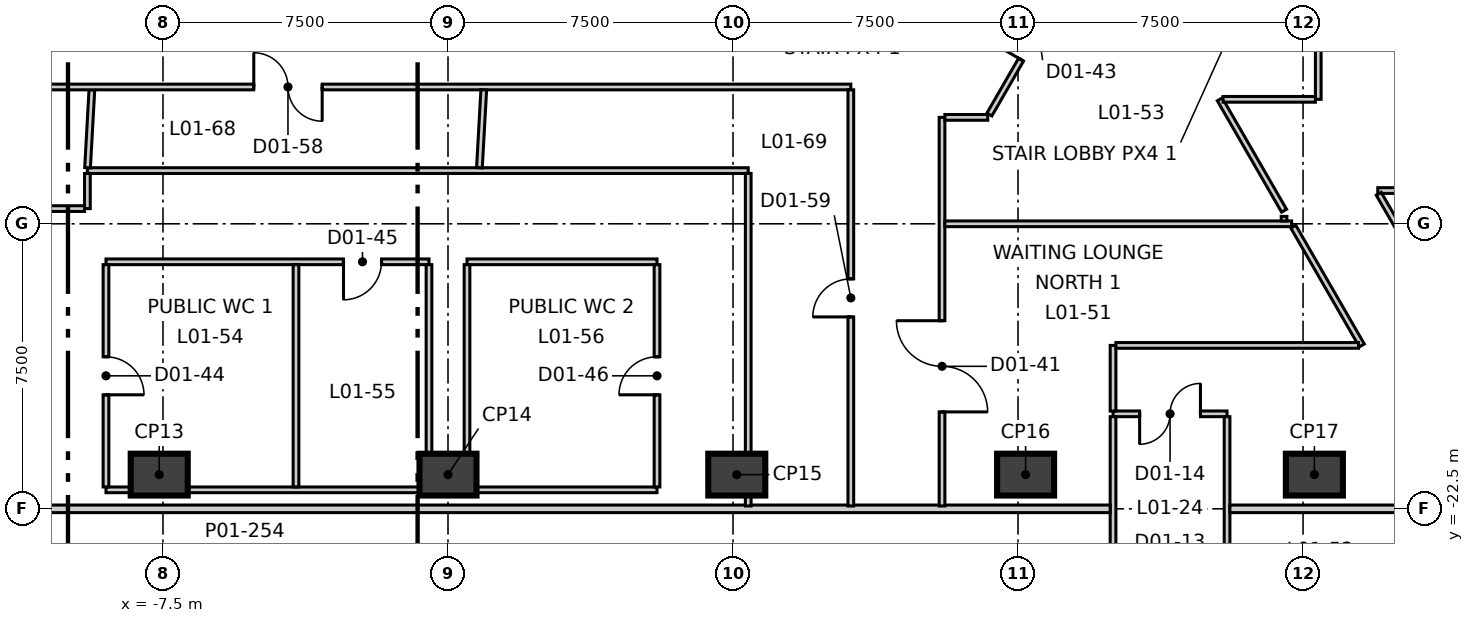
"""IFC4 building model, lengths in metres.
Left out: names, types, materials, properties, quantities, classifications, styles, units other than length and angle.
Written with IfcOpenShell. Run it as: python <this file> out.ifc"""

import sys

from ifc_helpers import new_model, si_unit, direction, frame, frame_2d, origin, origin_2d, place, context, subcontext, project, spatial, rectangle, extrude, element, fill, save


model = new_model("IFC4")
c1 = context("Model", 3, precision=1e-05, world=origin(), true_north=direction((0.0, 1.0)))
c2 = subcontext(c1, "Body", "Model", "MODEL_VIEW")
j1 = project(units=[si_unit("LENGTHUNIT", "METRE"), si_unit("PLANEANGLEUNIT", "RADIAN")], contexts=[c1])
p1 = place(None, origin())
s1 = spatial("IfcSite", under=j1, at=p1, CompositionType="ELEMENT")
p2 = place(p1, origin())
s2 = spatial("IfcBuilding", under=s1, at=p2, CompositionType="ELEMENT")
p3 = place(p2, frame((0.0, 0.0, 8.5)))
s3 = spatial("IfcBuildingStorey", under=s2, at=p3, CompositionType="ELEMENT", Elevation=8.5)
for number, where, z_axis, x_axis in (
    (1, (-7.599, -21.6, -0.4), (0.0, 0.0, 1.0), (1.0, 0.0, 0.0)),
    (2, (0.0, -21.6, -0.4), (0.0, 0.0, 1.0), (1.0, 0.0, 0.0)),
    (3, (7.599, -21.6, -0.4), (0.0, 0.0, 1.0), (1.0, 0.0, 0.0)),
    (4, (15.199, -21.6, -0.4), (0.0, 0.0, 1.0), (1.0, 0.0, 0.0)),
    (5, (22.798, -21.6, -0.4), (0.0, 0.0, 1.0), (1.0, 0.0, 0.0)),
):
    element("IfcColumn", number, at=place(p3, frame(where, z_axis=z_axis, x_axis=x_axis)), inside=s3, PredefinedType="COLUMN", context=c2, shape_type="SweptSolid", body=[
        extrude(rectangle(XDim=1.5, YDim=1.1, at=origin_2d()), origin(), (0.0, 0.0, 1.0), 6.0),
    ])
p4 = place(p3, frame((17.5, -20.0, 0.0), z_axis=(0.0, 0.0, 1.0), x_axis=(1.0, 0.0, 0.0)))
e6 = element("IfcWall", 6, at=p4, inside=s3, PredefinedType="PARTITIONING", context=c2, shape_type="SweptSolid", body=[
    extrude(rectangle(XDim=3.0, YDim=0.15, at=frame_2d((1.5, 0.0))), origin(), (0.0, 0.0, 1.0), 5.6),
])
p5 = place(p4, frame((0.7, 0.0, 0.0)))
e7 = element("IfcOpeningElement", 7, at=p5, cuts=e6, PredefinedType="OPENING", context=c2, shape_type="SweptSolid", body=[
    extrude(rectangle(XDim=1.6, YDim=2.1, at=frame_2d((0.8, 1.05))), frame((0.0, 0.085, 0.0), z_axis=(0.0, -1.0, 0.0), x_axis=(1.0, 0.0, 0.0)), (0.0, 0.0, 1.0), 0.17),
])
for number, where, z_axis, x_axis in (
    (8, (17.5, -24.925, 0.0), (0.0, 0.0, 1.0), (0.0, 1.0, 0.0)),
    (9, (20.5, -24.925, 0.0), (0.0, 0.0, 1.0), (0.0, 1.0, 0.0)),
):
    element("IfcWall", number, at=place(p3, frame(where, z_axis=z_axis, x_axis=x_axis)), inside=s3, PredefinedType="PARTITIONING", context=c2, shape_type="SweptSolid", body=[
        extrude(rectangle(XDim=4.85, YDim=0.15, at=frame_2d((2.425, 0.0))), origin(), (0.0, 0.0, 1.0), 5.6),
    ])
p6 = place(p3, frame((-17.425, -22.5, 0.0), z_axis=(0.0, 0.0, 1.0), x_axis=(1.0, 0.0, 0.0)))
e10 = element("IfcWall", 10, at=p6, inside=s3, PredefinedType="SOLIDWALL", context=c2, shape_type="SweptSolid", body=[
    extrude(rectangle(XDim=34.85, YDim=0.2, at=frame_2d((17.425, 0.0))), origin(), (0.0, 0.0, 1.0), 5.6),
])
p7 = place(p3, frame((20.575, -22.5, 0.0), z_axis=(0.0, 0.0, 1.0), x_axis=(1.0, 0.0, 0.0)))
e11 = element("IfcWall", 11, at=p7, inside=s3, PredefinedType="SOLIDWALL", context=c2, shape_type="SweptSolid", body=[
    extrude(rectangle(XDim=11.266, YDim=0.2, at=frame_2d((5.633, 0.0))), origin(), (0.0, 0.0, 1.0), 5.6),
])
p8 = place(p3, frame((24.466, -14.125, 0.0), z_axis=(0.0, 0.0, 1.0), x_axis=(1.0, 0.0, 0.0)))
e12 = element("IfcWall", 12, at=p8, inside=s3, PredefinedType="PARTITIONING", context=c2, shape_type="SweptSolid", body=[
    extrude(rectangle(XDim=0.834, YDim=0.15, at=frame_2d((0.417, 0.0))), origin(), (0.0, 0.0, 1.0), 5.6),
])
p9 = place(p3, frame((-9.489, -13.6, 0.0), z_axis=(0.0, 0.0, 1.0), x_axis=(1.0, 0.0, 0.0)))
e13 = element("IfcWall", 13, at=p9, inside=s3, PredefinedType="PARTITIONING", context=c2, shape_type="SweptSolid", body=[
    extrude(rectangle(XDim=17.389, YDim=0.15, at=frame_2d((8.694, 0.0))), origin(), (0.0, 0.0, 1.0), 5.6),
])
p10 = place(p3, frame((-9.485, -13.525, 0.0), z_axis=(0.0, 0.0, 1.0), x_axis=(0.055535883175, 0.99845669194, 0.0)))
e14 = element("IfcWall", 14, at=p10, inside=s3, PredefinedType="PARTITIONING", context=c2, shape_type="SweptSolid", body=[
    extrude(rectangle(XDim=2.053, YDim=0.15, at=frame_2d((1.026, 0.0))), origin(), (0.0, 0.0, 1.0), 5.6),
])
p11 = place(p3, frame((-9.489, -14.6, 0.0), z_axis=(0.0, 0.0, 1.0), x_axis=(0.0, 1.0, 0.0)))
e15 = element("IfcWall", 15, at=p11, inside=s3, PredefinedType="PARTITIONING", context=c2, shape_type="SweptSolid", body=[
    extrude(rectangle(XDim=0.925, YDim=0.15, at=frame_2d((0.462, 0.0))), origin(), (0.0, 0.0, 1.0), 5.6),
])
p12 = place(p3, frame((-19.6, -14.6, 0.0), z_axis=(0.0, 0.0, 1.0), x_axis=(1.0, 0.0, 0.0)))
e16 = element("IfcWall", 16, at=p12, inside=s3, PredefinedType="PARTITIONING", context=c2, shape_type="SweptSolid", body=[
    extrude(rectangle(XDim=10.036, YDim=0.15, at=frame_2d((5.018, 0.0))), origin(), (0.0, 0.0, 1.0), 5.6),
])
p13 = place(p12, frame((4.156, 0.0, 0.0)))
e17 = element("IfcOpeningElement", 17, at=p13, cuts=e16, PredefinedType="OPENING", context=c2, shape_type="SweptSolid", body=[
    extrude(rectangle(XDim=1.8, YDim=2.1, at=frame_2d((0.9, 1.05))), frame((0.0, 0.085, 0.0), z_axis=(0.0, -1.0, 0.0), x_axis=(1.0, 0.0, 0.0)), (0.0, 0.0, 1.0), 0.17),
])
p14 = place(p3, frame((-13.654, -11.4, 0.0), z_axis=(0.0, 0.0, 1.0), x_axis=(1.0, 0.0, 0.0)))
e18 = element("IfcWall", 18, at=p14, inside=s3, PredefinedType="PARTITIONING", context=c2, shape_type="SweptSolid", body=[
    extrude(rectangle(XDim=24.254, YDim=0.15, at=frame_2d((12.127, 0.0))), origin(), (0.0, 0.0, 1.0), 5.6),
])
p15 = place(p14, frame((8.543, 0.0, 0.0)))
e19 = element("IfcOpeningElement", 19, at=p15, cuts=e18, PredefinedType="OPENING", context=c2, shape_type="SweptSolid", body=[
    extrude(rectangle(XDim=1.8, YDim=2.1, at=frame_2d((0.9, 1.05))), frame((0.0, 0.085, 0.0), z_axis=(0.0, -1.0, 0.0), x_axis=(1.0, 0.0, 0.0)), (0.0, 0.0, 1.0), 0.17),
])
p16 = place(p3, frame((-9.0, -16.0, 0.0), z_axis=(0.0, 0.0, 1.0), x_axis=(1.0, 0.0, 0.0)))
e20 = element("IfcWall", 20, at=p16, inside=s3, PredefinedType="PARTITIONING", context=c2, shape_type="SweptSolid", body=[
    extrude(rectangle(XDim=8.5, YDim=0.15, at=frame_2d((4.25, 0.0))), origin(), (0.0, 0.0, 1.0), 5.6),
])
p17 = place(p16, frame((6.25, 0.0, 0.0)))
e21 = element("IfcOpeningElement", 21, at=p17, cuts=e20, PredefinedType="OPENING", context=c2, shape_type="SweptSolid", body=[
    extrude(rectangle(XDim=1.0, YDim=2.1, at=frame_2d((0.5, 1.05))), frame((0.0, 0.085, 0.0), z_axis=(0.0, -1.0, 0.0), x_axis=(1.0, 0.0, 0.0)), (0.0, 0.0, 1.0), 0.17),
])
p18 = place(p3, frame((0.5, -16.0, 0.0), z_axis=(0.0, 0.0, 1.0), x_axis=(1.0, 0.0, 0.0)))
e22 = element("IfcWall", 22, at=p18, inside=s3, PredefinedType="PARTITIONING", context=c2, shape_type="SweptSolid", body=[
    extrude(rectangle(XDim=5.0, YDim=0.15, at=frame_2d((2.5, 0.0))), origin(), (0.0, 0.0, 1.0), 5.6),
])
p19 = place(p3, frame((-0.5, -22.0, 0.0), z_axis=(0.0, 0.0, 1.0), x_axis=(0.0, 1.0, 0.0)))
e23 = element("IfcWall", 23, at=p19, inside=s3, PredefinedType="PARTITIONING", context=c2, shape_type="SweptSolid", body=[
    extrude(rectangle(XDim=5.925, YDim=0.15, at=frame_2d((2.962, 0.0))), origin(), (0.0, 0.0, 1.0), 5.1),
])
p20 = place(p3, frame((-9.0, -22.0, 0.0), z_axis=(0.0, 0.0, 1.0), x_axis=(1.0, 0.0, 0.0)))
e24 = element("IfcWall", 24, at=p20, inside=s3, PredefinedType="PARTITIONING", context=c2, shape_type="SweptSolid", body=[
    extrude(rectangle(XDim=8.425, YDim=0.15, at=frame_2d((4.212, 0.0))), origin(), (0.0, 0.0, 1.0), 5.6),
])
p21 = place(p3, frame((0.5, -22.0, 0.0), z_axis=(0.0, 0.0, 1.0), x_axis=(1.0, 0.0, 0.0)))
e25 = element("IfcWall", 25, at=p21, inside=s3, PredefinedType="PARTITIONING", context=c2, shape_type="SweptSolid", body=[
    extrude(rectangle(XDim=5.0, YDim=0.15, at=frame_2d((2.5, 0.0))), origin(), (0.0, 0.0, 1.0), 5.6),
])
p22 = place(p3, frame((-4.0, -21.925, 0.0), z_axis=(0.0, 0.0, 1.0), x_axis=(0.0, 1.0, 0.0)))
e26 = element("IfcWall", 26, at=p22, inside=s3, PredefinedType="PARTITIONING", context=c2, shape_type="SweptSolid", body=[
    extrude(rectangle(XDim=5.85, YDim=0.15, at=frame_2d((2.925, 0.0))), origin(), (0.0, 0.0, 1.0), 5.6),
])
p23 = place(p3, frame((-9.0, -21.925, 0.0), z_axis=(0.0, 0.0, 1.0), x_axis=(0.0, 1.0, 0.0)))
e27 = element("IfcWall", 27, at=p23, inside=s3, PredefinedType="PARTITIONING", context=c2, shape_type="SweptSolid", body=[
    extrude(rectangle(XDim=5.85, YDim=0.15, at=frame_2d((2.925, 0.0))), origin(), (0.0, 0.0, 1.0), 5.6),
])
p24 = place(p23, frame((2.425, 0.0, 0.0)))
e28 = element("IfcOpeningElement", 28, at=p24, cuts=e27, PredefinedType="OPENING", context=c2, shape_type="SweptSolid", body=[
    extrude(rectangle(XDim=1.0, YDim=2.1, at=frame_2d((0.5, 1.05))), frame((0.0, 0.085, 0.0), z_axis=(0.0, -1.0, 0.0), x_axis=(1.0, 0.0, 0.0)), (0.0, 0.0, 1.0), 0.17),
])
p25 = place(p3, frame((7.9, -22.425, 0.0), z_axis=(0.0, 0.0, 1.0), x_axis=(0.0, 1.0, 0.0)))
e29 = element("IfcWall", 29, at=p25, inside=s3, PredefinedType="PARTITIONING", context=c2, shape_type="SweptSolid", body=[
    extrude(rectangle(XDim=8.75, YDim=0.15, at=frame_2d((4.375, 0.0))), origin(), (0.0, 0.0, 1.0), 5.6),
])
p26 = place(p3, frame((0.827, -13.525, 0.0), z_axis=(0.0, 0.0, 1.0), x_axis=(0.055535883175, 0.99845669194, 0.0)))
e30 = element("IfcWall", 30, at=p26, inside=s3, PredefinedType="PARTITIONING", context=c2, shape_type="SweptSolid", body=[
    extrude(rectangle(XDim=2.053, YDim=0.15, at=frame_2d((1.026, 0.0))), origin(), (0.0, 0.0, 1.0), 5.6),
])
p27 = place(p3, frame((10.6, -22.425, 0.0), z_axis=(0.0, 0.0, 1.0), x_axis=(0.0, 1.0, 0.0)))
e31 = element("IfcWall", 31, at=p27, inside=s3, PredefinedType="PARTITIONING", context=c2, shape_type="SweptSolid", body=[
    extrude(rectangle(XDim=10.95, YDim=0.15, at=frame_2d((5.475, 0.0))), origin(), (0.0, 0.0, 1.0), 5.6),
])
p28 = place(p27, frame((4.975, 0.0, 0.0)))
e32 = element("IfcOpeningElement", 32, at=p28, cuts=e31, PredefinedType="OPENING", context=c2, shape_type="SweptSolid", body=[
    extrude(rectangle(XDim=1.0, YDim=2.1, at=frame_2d((0.5, 1.05))), frame((0.0, 0.085, 0.0), z_axis=(0.0, -1.0, 0.0), x_axis=(1.0, 0.0, 0.0)), (0.0, 0.0, 1.0), 0.17),
])
p29 = place(p3, frame((17.5, -19.927, 0.0), z_axis=(0.0, 0.0, 1.0), x_axis=(0.0, 1.0, 0.0)))
e33 = element("IfcWall", 33, at=p29, inside=s3, PredefinedType="PARTITIONING", context=c2, shape_type="SweptSolid", body=[
    extrude(rectangle(XDim=1.727, YDim=0.15, at=frame_2d((0.864, 0.0))), origin(), (0.0, 0.0, 1.0), 5.6),
])
p30 = place(p3, frame((13.0, -22.425, 0.0), z_axis=(0.0, 0.0, 1.0), x_axis=(0.0, 1.0, 0.0)))
e34 = element("IfcWall", 34, at=p30, inside=s3, PredefinedType="PARTITIONING", context=c2, shape_type="SweptSolid", body=[
    extrude(rectangle(XDim=10.225, YDim=0.15, at=frame_2d((5.113, 0.0))), origin(), (0.0, 0.0, 1.0), 5.6),
])
p31 = place(p30, frame((2.475, 0.0, 0.0)))
e35 = element("IfcOpeningElement", 35, at=p31, cuts=e34, PredefinedType="OPENING", context=c2, shape_type="SweptSolid", body=[
    extrude(rectangle(XDim=2.4, YDim=2.1, at=frame_2d((1.2, 1.05))), frame((0.0, 0.085, 0.0), z_axis=(0.0, -1.0, 0.0), x_axis=(1.0, 0.0, 0.0)), (0.0, 0.0, 1.0), 0.17),
])
p32 = place(p3, frame((13.075, -15.0, 0.0), z_axis=(0.0, 0.0, 1.0), x_axis=(1.0, 0.0, 0.0)))
e36 = element("IfcWall", 36, at=p32, inside=s3, PredefinedType="PARTITIONING", context=c2, shape_type="SweptSolid", body=[
    extrude(rectangle(XDim=9.124, YDim=0.15, at=frame_2d((4.562, 0.0))), origin(), (0.0, 0.0, 1.0), 5.6),
])
p33 = place(p3, frame((13.075, -12.2, 0.0), z_axis=(0.0, 0.0, 1.0), x_axis=(1.0, 0.0, 0.0)))
e37 = element("IfcWall", 37, at=p33, inside=s3, PredefinedType="PARTITIONING", context=c2, shape_type="SweptSolid", body=[
    extrude(rectangle(XDim=1.128, YDim=0.15, at=frame_2d((0.564, 0.0))), origin(), (0.0, 0.0, 1.0), 5.6),
])
p34 = place(p3, frame((14.246, -12.125, 0.0), z_axis=(0.0, 0.0, 1.0), x_axis=(0.500018862428, 0.866014513283, 0.0)))
e38 = element("IfcWall", 38, at=p34, inside=s3, PredefinedType="PARTITIONING", context=c2, shape_type="SweptSolid", body=[
    extrude(rectangle(XDim=5.11, YDim=0.15, at=frame_2d((2.555, 0.0))), origin(), (0.0, 0.0, 1.0), 5.6),
])
p35 = place(p34, frame((1.669, 0.0, 0.0)))
e39 = element("IfcOpeningElement", 39, at=p35, cuts=e38, PredefinedType="OPENING", context=c2, shape_type="SweptSolid", body=[
    extrude(rectangle(XDim=1.8, YDim=2.1, at=frame_2d((0.9, 1.05))), frame((0.0, 0.085, 0.0), z_axis=(0.0, -1.0, 0.0), x_axis=(1.0, 0.0, 0.0)), (0.0, 0.0, 1.0), 0.17),
])
p36 = place(p3, frame((20.309, -11.725, 0.0), z_axis=(0.0, 0.0, 1.0), x_axis=(0.499849486556, -0.866112285324, 0.0)))
e40 = element("IfcWall", 40, at=p36, inside=s3, PredefinedType="PARTITIONING", context=c2, shape_type="SweptSolid", body=[
    extrude(rectangle(XDim=3.383, YDim=0.15, at=frame_2d((1.691, 0.0))), origin(), (0.0, 0.0, 1.0), 5.6),
])
p37 = place(p3, frame((22.243, -15.075, 0.0), z_axis=(0.0, 0.0, 1.0), x_axis=(0.499995765644, -0.866027848477, 0.0)))
e41 = element("IfcWall", 41, at=p37, inside=s3, PredefinedType="PARTITIONING", context=c2, shape_type="SweptSolid", body=[
    extrude(rectangle(XDim=3.608, YDim=0.15, at=frame_2d((1.804, 0.0))), origin(), (0.0, 0.0, 1.0), 5.6),
])
p38 = place(p3, frame((17.575, -18.2, 0.0), z_axis=(0.0, 0.0, 1.0), x_axis=(1.0, 0.0, 0.0)))
e42 = element("IfcWall", 42, at=p38, inside=s3, PredefinedType="PARTITIONING", context=c2, shape_type="SweptSolid", body=[
    extrude(rectangle(XDim=6.385, YDim=0.15, at=frame_2d((3.192, 0.0))), origin(), (0.0, 0.0, 1.0), 5.6),
])
p39 = place(p3, frame((22.9, -11.725, 0.0), z_axis=(0.0, 0.0, 1.0), x_axis=(0.0, 1.0, 0.0)))
e43 = element("IfcWall", 43, at=p39, inside=s3, PredefinedType="PARTITIONING", context=c2, shape_type="SweptSolid", body=[
    extrude(rectangle(XDim=4.05, YDim=0.15, at=frame_2d((2.025, 0.0))), origin(), (0.0, 0.0, 1.0), 5.6),
])
p40 = place(p3, frame((20.395, -11.725, 0.0), z_axis=(0.0, 0.0, 1.0), x_axis=(1.0, 0.0, 0.0)))
e44 = element("IfcWall", 44, at=p40, inside=s3, PredefinedType="PARTITIONING", context=c2, shape_type="SweptSolid", body=[
    extrude(rectangle(XDim=2.43, YDim=0.15, at=frame_2d((1.215, 0.0))), origin(), (0.0, 0.0, 1.0), 5.6),
])
p41 = place(p3, frame((22.0, -14.925, 0.0), z_axis=(0.0, 0.0, 1.0), x_axis=(0.0, 1.0, 0.0)))
e45 = element("IfcWall", 45, at=p41, inside=s3, PredefinedType="PARTITIONING", context=c2, shape_type="SweptSolid", body=[
    extrude(rectangle(XDim=0.12, YDim=0.15, at=frame_2d((0.06, 0.0))), origin(), (0.0, 0.0, 1.0), 5.6),
])
p42 = place(p3, frame((24.491, -14.21, 0.0), z_axis=(0.0, 0.0, 1.0), x_axis=(0.499994996542, -0.866028292513, 0.0)))
e46 = element("IfcWall", 46, at=p42, inside=s3, PredefinedType="PARTITIONING", context=c2, shape_type="SweptSolid", body=[
    extrude(rectangle(XDim=9.486, YDim=0.15, at=frame_2d((4.743, 0.0))), origin(), (0.0, 0.0, 1.0), 5.6),
])
p43 = place(p42, frame((7.172, 0.0, 0.0)))
e47 = element("IfcOpeningElement", 47, at=p43, cuts=e46, PredefinedType="OPENING", context=c2, shape_type="SweptSolid", body=[
    extrude(rectangle(XDim=1.0, YDim=2.1, at=frame_2d((0.5, 1.05))), frame((0.0, 0.085, 0.0), z_axis=(0.0, -1.0, 0.0), x_axis=(1.0, 0.0, 0.0)), (0.0, 0.0, 1.0), 0.17),
])
p44 = place(p3, frame((0.5, -21.925, 0.0), z_axis=(0.0, 0.0, 1.0), x_axis=(0.0, 1.0, 0.0)))
e48 = element("IfcWall", 48, at=p44, inside=s3, PredefinedType="PARTITIONING", context=c2, shape_type="SweptSolid", body=[
    extrude(rectangle(XDim=5.85, YDim=0.15, at=frame_2d((2.925, 0.0))), origin(), (0.0, 0.0, 1.0), 5.1),
])
p45 = place(p3, frame((5.5, -21.925, 0.0), z_axis=(0.0, 0.0, 1.0), x_axis=(0.0, 1.0, 0.0)))
e49 = element("IfcWall", 49, at=p45, inside=s3, PredefinedType="PARTITIONING", context=c2, shape_type="SweptSolid", body=[
    extrude(rectangle(XDim=5.85, YDim=0.15, at=frame_2d((2.925, 0.0))), origin(), (0.0, 0.0, 1.0), 5.6),
])
p46 = place(p45, frame((2.425, 0.0, 0.0)))
e50 = element("IfcOpeningElement", 50, at=p46, cuts=e49, PredefinedType="OPENING", context=c2, shape_type="SweptSolid", body=[
    extrude(rectangle(XDim=1.0, YDim=2.1, at=frame_2d((0.5, 1.05))), frame((0.0, 0.085, 0.0), z_axis=(0.0, -1.0, 0.0), x_axis=(1.0, 0.0, 0.0)), (0.0, 0.0, 1.0), 0.17),
])
p47 = place(p5, origin())
e51 = element("IfcDoor", 51, at=p47, inside=s3, OperationType="DOUBLE_DOOR_SINGLE_SWING", PredefinedType="DOOR", context=c2, shape_type="SweptSolid", body=[
    extrude(rectangle(XDim=1.6, YDim=2.1, at=frame_2d((0.8, 1.05))), frame((0.0, 0.025, 0.0), z_axis=(0.0, -1.0, 0.0), x_axis=(1.0, 0.0, 0.0)), (0.0, 0.0, 1.0), 0.05),
])
fill(e7, e51)
p48 = place(p31, origin())
e52 = element("IfcDoor", 52, at=p48, inside=s3, OperationType="DOUBLE_DOOR_SINGLE_SWING", PredefinedType="DOOR", context=c2, shape_type="SweptSolid", body=[
    extrude(rectangle(XDim=2.4, YDim=2.1, at=frame_2d((1.2, 1.05))), frame((0.0, 0.025, 0.0), z_axis=(0.0, -1.0, 0.0), x_axis=(1.0, 0.0, 0.0)), (0.0, 0.0, 1.0), 0.05),
])
fill(e35, e52)
p49 = place(p35, origin())
e53 = element("IfcDoor", 53, at=p49, inside=s3, OperationType="DOUBLE_DOOR_SINGLE_SWING", PredefinedType="DOOR", context=c2, shape_type="SweptSolid", body=[
    extrude(rectangle(XDim=1.8, YDim=2.1, at=frame_2d((0.9, 1.05))), frame((0.0, 0.025, 0.0), z_axis=(0.0, -1.0, 0.0), x_axis=(1.0, 0.0, 0.0)), (0.0, 0.0, 1.0), 0.05),
])
fill(e39, e53)
p50 = place(p24, origin())
e54 = element("IfcDoor", 54, at=p50, inside=s3, OperationType="SINGLE_SWING_LEFT", PredefinedType="DOOR", context=c2, shape_type="SweptSolid", body=[
    extrude(rectangle(XDim=1.0, YDim=2.1, at=frame_2d((0.5, 1.05))), frame((0.0, 0.025, 0.0), z_axis=(0.0, -1.0, 0.0), x_axis=(1.0, 0.0, 0.0)), (0.0, 0.0, 1.0), 0.05),
])
fill(e28, e54)
p51 = place(p17, origin())
e55 = element("IfcDoor", 55, at=p51, inside=s3, OperationType="SINGLE_SWING_LEFT", PredefinedType="DOOR", context=c2, shape_type="SweptSolid", body=[
    extrude(rectangle(XDim=1.0, YDim=2.1, at=frame_2d((0.5, 1.05))), frame((0.0, 0.025, 0.0), z_axis=(0.0, -1.0, 0.0), x_axis=(1.0, 0.0, 0.0)), (0.0, 0.0, 1.0), 0.05),
])
fill(e21, e55)
p52 = place(p46, origin())
e56 = element("IfcDoor", 56, at=p52, inside=s3, OperationType="SINGLE_SWING_RIGHT", PredefinedType="DOOR", context=c2, shape_type="SweptSolid", body=[
    extrude(rectangle(XDim=1.0, YDim=2.1, at=frame_2d((0.5, 1.05))), frame((0.0, 0.025, 0.0), z_axis=(0.0, -1.0, 0.0), x_axis=(1.0, 0.0, 0.0)), (0.0, 0.0, 1.0), 0.05),
])
fill(e50, e56)
p53 = place(p15, origin())
e57 = element("IfcDoor", 57, at=p53, inside=s3, OperationType="DOUBLE_DOOR_SINGLE_SWING", PredefinedType="DOOR", context=c2, shape_type="SweptSolid", body=[
    extrude(rectangle(XDim=1.8, YDim=2.1, at=frame_2d((0.9, 1.05))), frame((0.0, 0.025, 0.0), z_axis=(0.0, -1.0, 0.0), x_axis=(1.0, 0.0, 0.0)), (0.0, 0.0, 1.0), 0.05),
])
fill(e19, e57)
p54 = place(p28, origin())
e58 = element("IfcDoor", 58, at=p54, inside=s3, OperationType="SINGLE_SWING_RIGHT", PredefinedType="DOOR", context=c2, shape_type="SweptSolid", body=[
    extrude(rectangle(XDim=1.0, YDim=2.1, at=frame_2d((0.5, 1.05))), frame((0.0, 0.025, 0.0), z_axis=(0.0, -1.0, 0.0), x_axis=(1.0, 0.0, 0.0)), (0.0, 0.0, 1.0), 0.05),
])
fill(e32, e58)
save(model, sys.argv[1])
